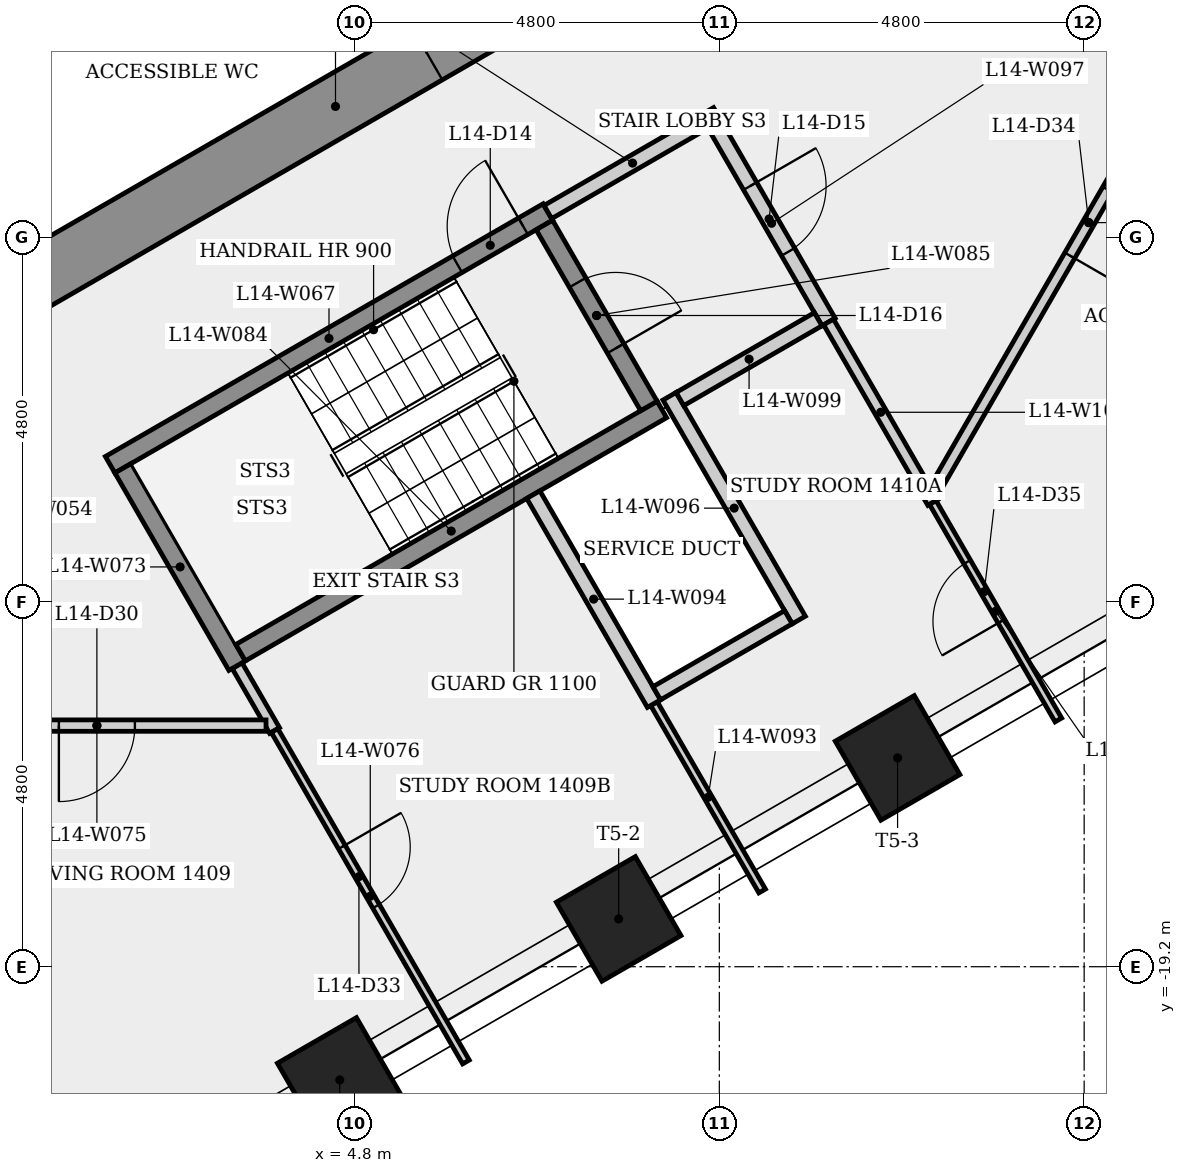
"""IFC4 building model, lengths in metres.
Left out: names, types, materials, properties, quantities, classifications, styles, units other than length and angle.
Written with IfcOpenShell. Run it as: python <this file> out.ifc"""

import sys

from ifc_helpers import new_model, si_unit, direction, frame, frame_2d, origin, origin_2d, place, context, subcontext, project, spatial, rectangle, extrude, element, fill, save


model = new_model("IFC4")
c1 = context("Model", 3, precision=1e-05, world=origin(), true_north=direction((0.0, 1.0)))
c2 = subcontext(c1, "Body", "Model", "MODEL_VIEW")
j1 = project(units=[si_unit("LENGTHUNIT", "METRE"), si_unit("PLANEANGLEUNIT", "RADIAN")], contexts=[c1])
p1 = place(None, origin())
s1 = spatial("IfcSite", under=j1, at=p1, CompositionType="ELEMENT")
p2 = place(p1, origin())
s2 = spatial("IfcBuilding", under=s1, at=p2, CompositionType="ELEMENT")
p3 = place(p2, frame((0.0, 0.0, 56.1)))
s3 = spatial("IfcBuildingStorey", under=s2, at=p3, CompositionType="ELEMENT", Elevation=56.1)
p4 = place(p3, frame((-0.2, -10.623, 0.0), z_axis=(0.0, 0.0, 1.0), x_axis=(0.866023993627, 0.500002442456, 0.0)))
e1 = element("IfcWall", 1, at=p4, inside=s3, PredefinedType="SHEAR", context=c2, shape_type="SweptSolid", body=[
    extrude(rectangle(XDim=10.97, YDim=0.8, at=frame_2d((5.485, 0.0))), origin(), (0.0, 0.0, 1.0), 3.4),
])
p5 = place(p4, frame((6.877, 0.0, 0.0)))
e2 = element("IfcOpeningElement", 2, at=p5, cuts=e1, PredefinedType="OPENING", context=c2, shape_type="SweptSolid", body=[
    extrude(rectangle(XDim=0.9, YDim=2.1, at=frame_2d((0.45, 1.05))), frame((0.0, 0.41, 0.0), z_axis=(0.0, -1.0, 0.0), x_axis=(1.0, 0.0, 0.0)), (0.0, 0.0, 1.0), 0.82),
])
for number, where, z_axis, x_axis in (
    (3, (4.606, -20.69, 0.0), (0.0, 0.0, 1.0), (0.5, -0.866, 0.0)),
    (4, (8.276, -18.571, 0.0), (0.0, 0.0, 1.0), (0.5, -0.866, 0.0)),
    (5, (11.945, -16.452, 0.0), (0.0, 0.0, 1.0), (0.5, -0.866, 0.0)),
):
    element("IfcColumn", number, at=place(p3, frame(where, z_axis=z_axis, x_axis=x_axis)), inside=s3, PredefinedType="COLUMN", context=c2, shape_type="SweptSolid", body=[
        extrude(rectangle(XDim=1.2, YDim=1.2, at=origin_2d()), origin(), (0.0, 0.0, 1.0), 3.4),
    ])
p6 = place(p3, frame((1.585, -12.595, 0.0), z_axis=(0.0, 0.0, 1.0), x_axis=(0.866036417653, 0.499980922934, 0.0)))
e6 = element("IfcWall", 6, at=p6, inside=s3, PredefinedType="SHEAR", context=c2, shape_type="SweptSolid", body=[
    extrude(rectangle(XDim=6.65, YDim=0.25, at=frame_2d((3.325, 0.0))), origin(), (0.0, 0.0, 1.0), 3.05),
])
p7 = place(p6, frame((5.275, 0.0, 0.0)))
e7 = element("IfcOpeningElement", 7, at=p7, cuts=e6, PredefinedType="OPENING", context=c2, shape_type="SweptSolid", body=[
    extrude(rectangle(XDim=1.0, YDim=2.1, at=frame_2d((0.5, 1.05))), frame((0.0, 0.135, 0.0), z_axis=(0.0, -1.0, 0.0), x_axis=(1.0, 0.0, 0.0)), (0.0, 0.0, 1.0), 0.27),
])
p8 = place(p3, frame((3.256, -15.239, 0.0), z_axis=(0.0, 0.0, 1.0), x_axis=(0.499815364442, -0.866131976934, 0.0)))
e8 = element("IfcWall", 8, at=p8, inside=s3, PredefinedType="PARTITIONING", context=c2, shape_type="SweptSolid", body=[
    extrude(rectangle(XDim=0.986, YDim=0.15, at=frame_2d((0.493, 0.0))), origin(), (0.0, 0.0, 1.0), 3.05),
])
p9 = place(p3, frame((3.256, -15.239, 0.0), z_axis=(0.0, 0.0, 1.0), x_axis=(-0.50002537861, 0.866010750942, 0.0)))
e9 = element("IfcWall", 9, at=p9, inside=s3, PredefinedType="SHEAR", context=c2, shape_type="SweptSolid", body=[
    extrude(rectangle(XDim=3.0, YDim=0.25, at=frame_2d((1.5, 0.0))), origin(), (0.0, 0.0, 1.0), 3.05),
])
p10 = place(p3, frame((3.636, -16.028, 0.0), z_axis=(0.0, 0.0, 1.0), x_axis=(-1.0, 0.0, 0.0)))
e10 = element("IfcWall", 10, at=p10, inside=s3, PredefinedType="PARTITIONING", context=c2, shape_type="SweptSolid", body=[
    extrude(rectangle(XDim=4.451, YDim=0.15, at=frame_2d((2.225, 0.0))), origin(), (0.0, 0.0, 1.0), 3.05),
])
p11 = place(p10, frame((1.725, 0.0, 0.0)))
e11 = element("IfcOpeningElement", 11, at=p11, cuts=e10, PredefinedType="OPENING", context=c2, shape_type="SweptSolid", body=[
    extrude(rectangle(XDim=1.0, YDim=2.1, at=frame_2d((0.5, 1.05))), frame((0.0, 0.085, 0.0), z_axis=(0.0, -1.0, 0.0), x_axis=(1.0, 0.0, 0.0)), (0.0, 0.0, 1.0), 0.17),
])
p12 = place(p3, frame((3.748, -16.093, 0.0), z_axis=(0.0, 0.0, 1.0), x_axis=(0.500028802338, -0.866008774109, 0.0)))
e12 = element("IfcWall", 12, at=p12, inside=s3, PredefinedType="PARTITIONING", context=c2, shape_type="SweptSolid", body=[
    extrude(rectangle(XDim=5.036, YDim=0.1, at=frame_2d((2.518, 0.0))), origin(), (0.0, 0.0, 1.0), 3.05),
])
p13 = place(p12, frame((1.77, 0.0, 0.0)))
e13 = element("IfcOpeningElement", 13, at=p13, cuts=e12, PredefinedType="OPENING", context=c2, shape_type="SweptSolid", body=[
    extrude(rectangle(XDim=0.9, YDim=2.1, at=frame_2d((0.45, 1.05))), frame((0.0, 0.06, 0.0), z_axis=(0.0, -1.0, 0.0), x_axis=(1.0, 0.0, 0.0)), (0.0, 0.0, 1.0), 0.12),
])
p14 = place(p3, frame((3.301, -15.068, 0.0), z_axis=(0.0, 0.0, 1.0), x_axis=(0.866035036182, 0.499983315828, 0.0)))
e14 = element("IfcWall", 14, at=p14, inside=s3, PredefinedType="SHEAR", context=c2, shape_type="SweptSolid", body=[
    extrude(rectangle(XDim=6.4, YDim=0.25, at=frame_2d((3.2, 0.0))), origin(), (0.0, 0.0, 1.0), 3.05),
])
p15 = place(p3, frame((7.298, -9.441, 0.0), z_axis=(0.0, 0.0, 1.0), x_axis=(0.500034990121, -0.866005201286, 0.0)))
e15 = element("IfcWall", 15, at=p15, inside=s3, PredefinedType="SHEAR", context=c2, shape_type="SweptSolid", body=[
    extrude(rectangle(XDim=2.75, YDim=0.25, at=frame_2d((1.375, 0.0))), origin(), (0.0, 0.0, 1.0), 3.05),
])
p16 = place(p15, frame((0.875, 0.0, 0.0)))
e16 = element("IfcOpeningElement", 16, at=p16, cuts=e15, PredefinedType="OPENING", context=c2, shape_type="SweptSolid", body=[
    extrude(rectangle(XDim=1.0, YDim=2.1, at=frame_2d((0.5, 1.05))), frame((0.0, 0.135, 0.0), z_axis=(0.0, -1.0, 0.0), x_axis=(1.0, 0.0, 0.0)), (0.0, 0.0, 1.0), 0.27),
])
p17 = place(p3, frame((7.344, -9.27, 0.0), z_axis=(0.0, 0.0, 1.0), x_axis=(0.866005588531, 0.500034319456, 0.0)))
e17 = element("IfcWall", 17, at=p17, inside=s3, PredefinedType="PARTITIONING", context=c2, shape_type="SweptSolid", body=[
    extrude(rectangle(XDim=2.575, YDim=0.2, at=frame_2d((1.288, 0.0))), origin(), (0.0, 0.0, 1.0), 3.05),
])
p18 = place(p3, frame((8.74, -15.738, 0.0), z_axis=(0.0, 0.0, 1.0), x_axis=(0.499994660107, -0.866028486751, 0.0)))
e18 = element("IfcWall", 18, at=p18, inside=s3, PredefinedType="PARTITIONING", context=c2, shape_type="SweptSolid", body=[
    extrude(rectangle(XDim=2.847, YDim=0.1, at=frame_2d((1.423, 0.0))), origin(), (0.0, 0.0, 1.0), 3.05),
])
p19 = place(p3, frame((8.74, -15.739, 0.0), z_axis=(0.0, 0.0, 1.0), x_axis=(-0.500017526161, 0.866015284814, 0.0)))
e19 = element("IfcWall", 19, at=p19, inside=s3, PredefinedType="PLUMBINGWALL", context=c2, shape_type="SweptSolid", body=[
    extrude(rectangle(XDim=3.175, YDim=0.2, at=frame_2d((1.588, 0.0))), origin(), (0.0, 0.0, 1.0), 3.05),
])
p20 = place(p3, frame((8.945, -11.694, 0.0), z_axis=(0.0, 0.0, 1.0), x_axis=(0.500062241894, -0.865989465428, 0.0)))
e20 = element("IfcWall", 20, at=p20, inside=s3, PredefinedType="PLUMBINGWALL", context=c2, shape_type="SweptSolid", body=[
    extrude(rectangle(XDim=3.4, YDim=0.2, at=frame_2d((1.7, 0.0))), origin(), (0.0, 0.0, 1.0), 3.05),
])
p21 = place(p3, frame((9.537, -8.119, 0.0), z_axis=(0.0, 0.0, 1.0), x_axis=(0.499990139034, -0.866031096941, 0.0)))
e21 = element("IfcWall", 21, at=p21, inside=s3, PredefinedType="PARTITIONING", context=c2, shape_type="SweptSolid", body=[
    extrude(rectangle(XDim=3.0, YDim=0.2, at=frame_2d((1.5, 0.0))), origin(), (0.0, 0.0, 1.0), 3.05),
])
p22 = place(p21, frame((0.935, 0.0, 0.0)))
e22 = element("IfcOpeningElement", 22, at=p22, cuts=e21, PredefinedType="OPENING", context=c2, shape_type="SweptSolid", body=[
    extrude(rectangle(XDim=1.0, YDim=2.1, at=frame_2d((0.5, 1.05))), frame((0.0, 0.11, 0.0), z_axis=(0.0, -1.0, 0.0), x_axis=(1.0, 0.0, 0.0)), (0.0, 0.0, 1.0), 0.22),
])
p23 = place(p3, frame((10.509, -14.602, 0.0), z_axis=(0.0, 0.0, 1.0), x_axis=(-0.866010750942, -0.50002537861, 0.0)))
e23 = element("IfcWall", 23, at=p23, inside=s3, PredefinedType="PLUMBINGWALL", context=c2, shape_type="SweptSolid", body=[
    extrude(rectangle(XDim=2.0, YDim=0.2, at=frame_2d((1.0, 0.0))), origin(), (0.0, 0.0, 1.0), 3.05),
])
p24 = place(p3, frame((10.901, -10.681, 0.0), z_axis=(0.0, 0.0, 1.0), x_axis=(-0.866009402589, -0.500027713859, 0.0)))
e24 = element("IfcWall", 24, at=p24, inside=s3, PredefinedType="PARTITIONING", context=c2, shape_type="SweptSolid", body=[
    extrude(rectangle(XDim=2.1, YDim=0.2, at=frame_2d((1.05, 0.0))), origin(), (0.0, 0.0, 1.0), 3.05),
])
p25 = place(p3, frame((12.409, -13.093, 0.0), z_axis=(0.0, 0.0, 1.0), x_axis=(-0.4999587362, 0.86604922614, 0.0)))
e25 = element("IfcWall", 25, at=p25, inside=s3, PredefinedType="PARTITIONING", context=c2, shape_type="SweptSolid", body=[
    extrude(rectangle(XDim=2.743, YDim=0.15, at=frame_2d((1.372, 0.0))), origin(), (0.0, 0.0, 1.0), 3.05),
])
p26 = place(p3, frame((14.061, -15.954, 0.0), z_axis=(0.0, 0.0, 1.0), x_axis=(-0.500001784407, 0.866024373554, 0.0)))
e26 = element("IfcWall", 26, at=p26, inside=s3, PredefinedType="PARTITIONING", context=c2, shape_type="SweptSolid", body=[
    extrude(rectangle(XDim=3.304, YDim=0.1, at=frame_2d((1.652, 0.0))), origin(), (0.0, 0.0, 1.0), 3.05),
])
p27 = place(p26, frame((1.5, 0.0, 0.0)))
e27 = element("IfcOpeningElement", 27, at=p27, cuts=e26, PredefinedType="OPENING", context=c2, shape_type="SweptSolid", body=[
    extrude(rectangle(XDim=0.9, YDim=2.1, at=frame_2d((0.45, 1.05))), frame((0.0, 0.06, 0.0), z_axis=(0.0, -1.0, 0.0), x_axis=(1.0, 0.0, 0.0)), (0.0, 0.0, 1.0), 0.12),
])
p28 = place(p3, frame((16.512, -5.856, 0.0), z_axis=(0.0, 0.0, 1.0), x_axis=(-0.500007444845, -0.866021105458, 0.0)))
e28 = element("IfcWall", 28, at=p28, inside=s3, PredefinedType="PARTITIONING", context=c2, shape_type="SweptSolid", body=[
    extrude(rectangle(XDim=8.206, YDim=0.15, at=frame_2d((4.103, 0.0))), origin(), (0.0, 0.0, 1.0), 3.05),
])
p29 = place(p28, frame((3.603, 0.0, 0.0)))
e29 = element("IfcOpeningElement", 29, at=p29, cuts=e28, PredefinedType="OPENING", context=c2, shape_type="SweptSolid", body=[
    extrude(rectangle(XDim=1.0, YDim=2.1, at=frame_2d((0.5, 1.05))), frame((0.0, 0.085, 0.0), z_axis=(0.0, -1.0, 0.0), x_axis=(1.0, 0.0, 0.0)), (0.0, 0.0, 1.0), 0.17),
])
p30 = place(p7, origin())
e30 = element("IfcDoor", 30, at=p30, inside=s3, OperationType="SINGLE_SWING_RIGHT", PredefinedType="DOOR", context=c2, shape_type="SweptSolid", body=[
    extrude(rectangle(XDim=1.0, YDim=2.1, at=frame_2d((0.5, 1.05))), frame((0.0, 0.025, 0.0), z_axis=(0.0, -1.0, 0.0), x_axis=(1.0, 0.0, 0.0)), (0.0, 0.0, 1.0), 0.05),
])
fill(e7, e30)
p31 = place(p22, origin())
e31 = element("IfcDoor", 31, at=p31, inside=s3, OperationType="SINGLE_SWING_LEFT", PredefinedType="DOOR", context=c2, shape_type="SweptSolid", body=[
    extrude(rectangle(XDim=1.0, YDim=2.1, at=frame_2d((0.5, 1.05))), frame((0.0, 0.025, 0.0), z_axis=(0.0, -1.0, 0.0), x_axis=(1.0, 0.0, 0.0)), (0.0, 0.0, 1.0), 0.05),
])
fill(e22, e31)
p32 = place(p16, origin())
e32 = element("IfcDoor", 32, at=p32, inside=s3, OperationType="SINGLE_SWING_RIGHT", PredefinedType="DOOR", context=c2, shape_type="SweptSolid", body=[
    extrude(rectangle(XDim=1.0, YDim=2.1, at=frame_2d((0.5, 1.05))), frame((0.0, 0.025, 0.0), z_axis=(0.0, -1.0, 0.0), x_axis=(1.0, 0.0, 0.0)), (0.0, 0.0, 1.0), 0.05),
])
fill(e16, e32)
p33 = place(p11, origin())
e33 = element("IfcDoor", 33, at=p33, inside=s3, OperationType="SINGLE_SWING_RIGHT", PredefinedType="DOOR", context=c2, shape_type="SweptSolid", body=[
    extrude(rectangle(XDim=1.0, YDim=2.1, at=frame_2d((0.5, 1.05))), frame((0.0, 0.025, 0.0), z_axis=(0.0, -1.0, 0.0), x_axis=(1.0, 0.0, 0.0)), (0.0, 0.0, 1.0), 0.05),
])
fill(e11, e33)
p34 = place(p13, origin())
e34 = element("IfcDoor", 34, at=p34, inside=s3, OperationType="SINGLE_SWING_LEFT", PredefinedType="DOOR", context=c2, shape_type="SweptSolid", body=[
    extrude(rectangle(XDim=0.9, YDim=2.1, at=frame_2d((0.45, 1.05))), frame((0.0, 0.025, 0.0), z_axis=(0.0, -1.0, 0.0), x_axis=(1.0, 0.0, 0.0)), (0.0, 0.0, 1.0), 0.05),
])
fill(e13, e34)
p35 = place(p29, origin())
e35 = element("IfcDoor", 35, at=p35, inside=s3, OperationType="SINGLE_SWING_RIGHT", PredefinedType="DOOR", context=c2, shape_type="SweptSolid", body=[
    extrude(rectangle(XDim=1.0, YDim=2.1, at=frame_2d((0.5, 1.05))), frame((0.0, 0.025, 0.0), z_axis=(0.0, -1.0, 0.0), x_axis=(1.0, 0.0, 0.0)), (0.0, 0.0, 1.0), 0.05),
])
fill(e29, e35)
p36 = place(p27, origin())
e36 = element("IfcDoor", 36, at=p36, inside=s3, OperationType="SINGLE_SWING_LEFT", PredefinedType="DOOR", context=c2, shape_type="SweptSolid", body=[
    extrude(rectangle(XDim=0.9, YDim=2.1, at=frame_2d((0.45, 1.05))), frame((0.0, 0.025, 0.0), z_axis=(0.0, -1.0, 0.0), x_axis=(1.0, 0.0, 0.0)), (0.0, 0.0, 1.0), 0.05),
])
fill(e27, e36)
p37 = place(p5, origin())
e37 = element("IfcDoor", 37, at=p37, inside=s3, OperationType="SINGLE_SWING_LEFT", PredefinedType="DOOR", context=c2, shape_type="SweptSolid", body=[
    extrude(rectangle(XDim=0.9, YDim=2.1, at=frame_2d((0.45, 1.05))), frame((0.0, 0.025, 0.0), z_axis=(0.0, -1.0, 0.0), x_axis=(1.0, 0.0, 0.0)), (0.0, 0.0, 1.0), 0.05),
])
fill(e2, e37)
save(model, sys.argv[1])
